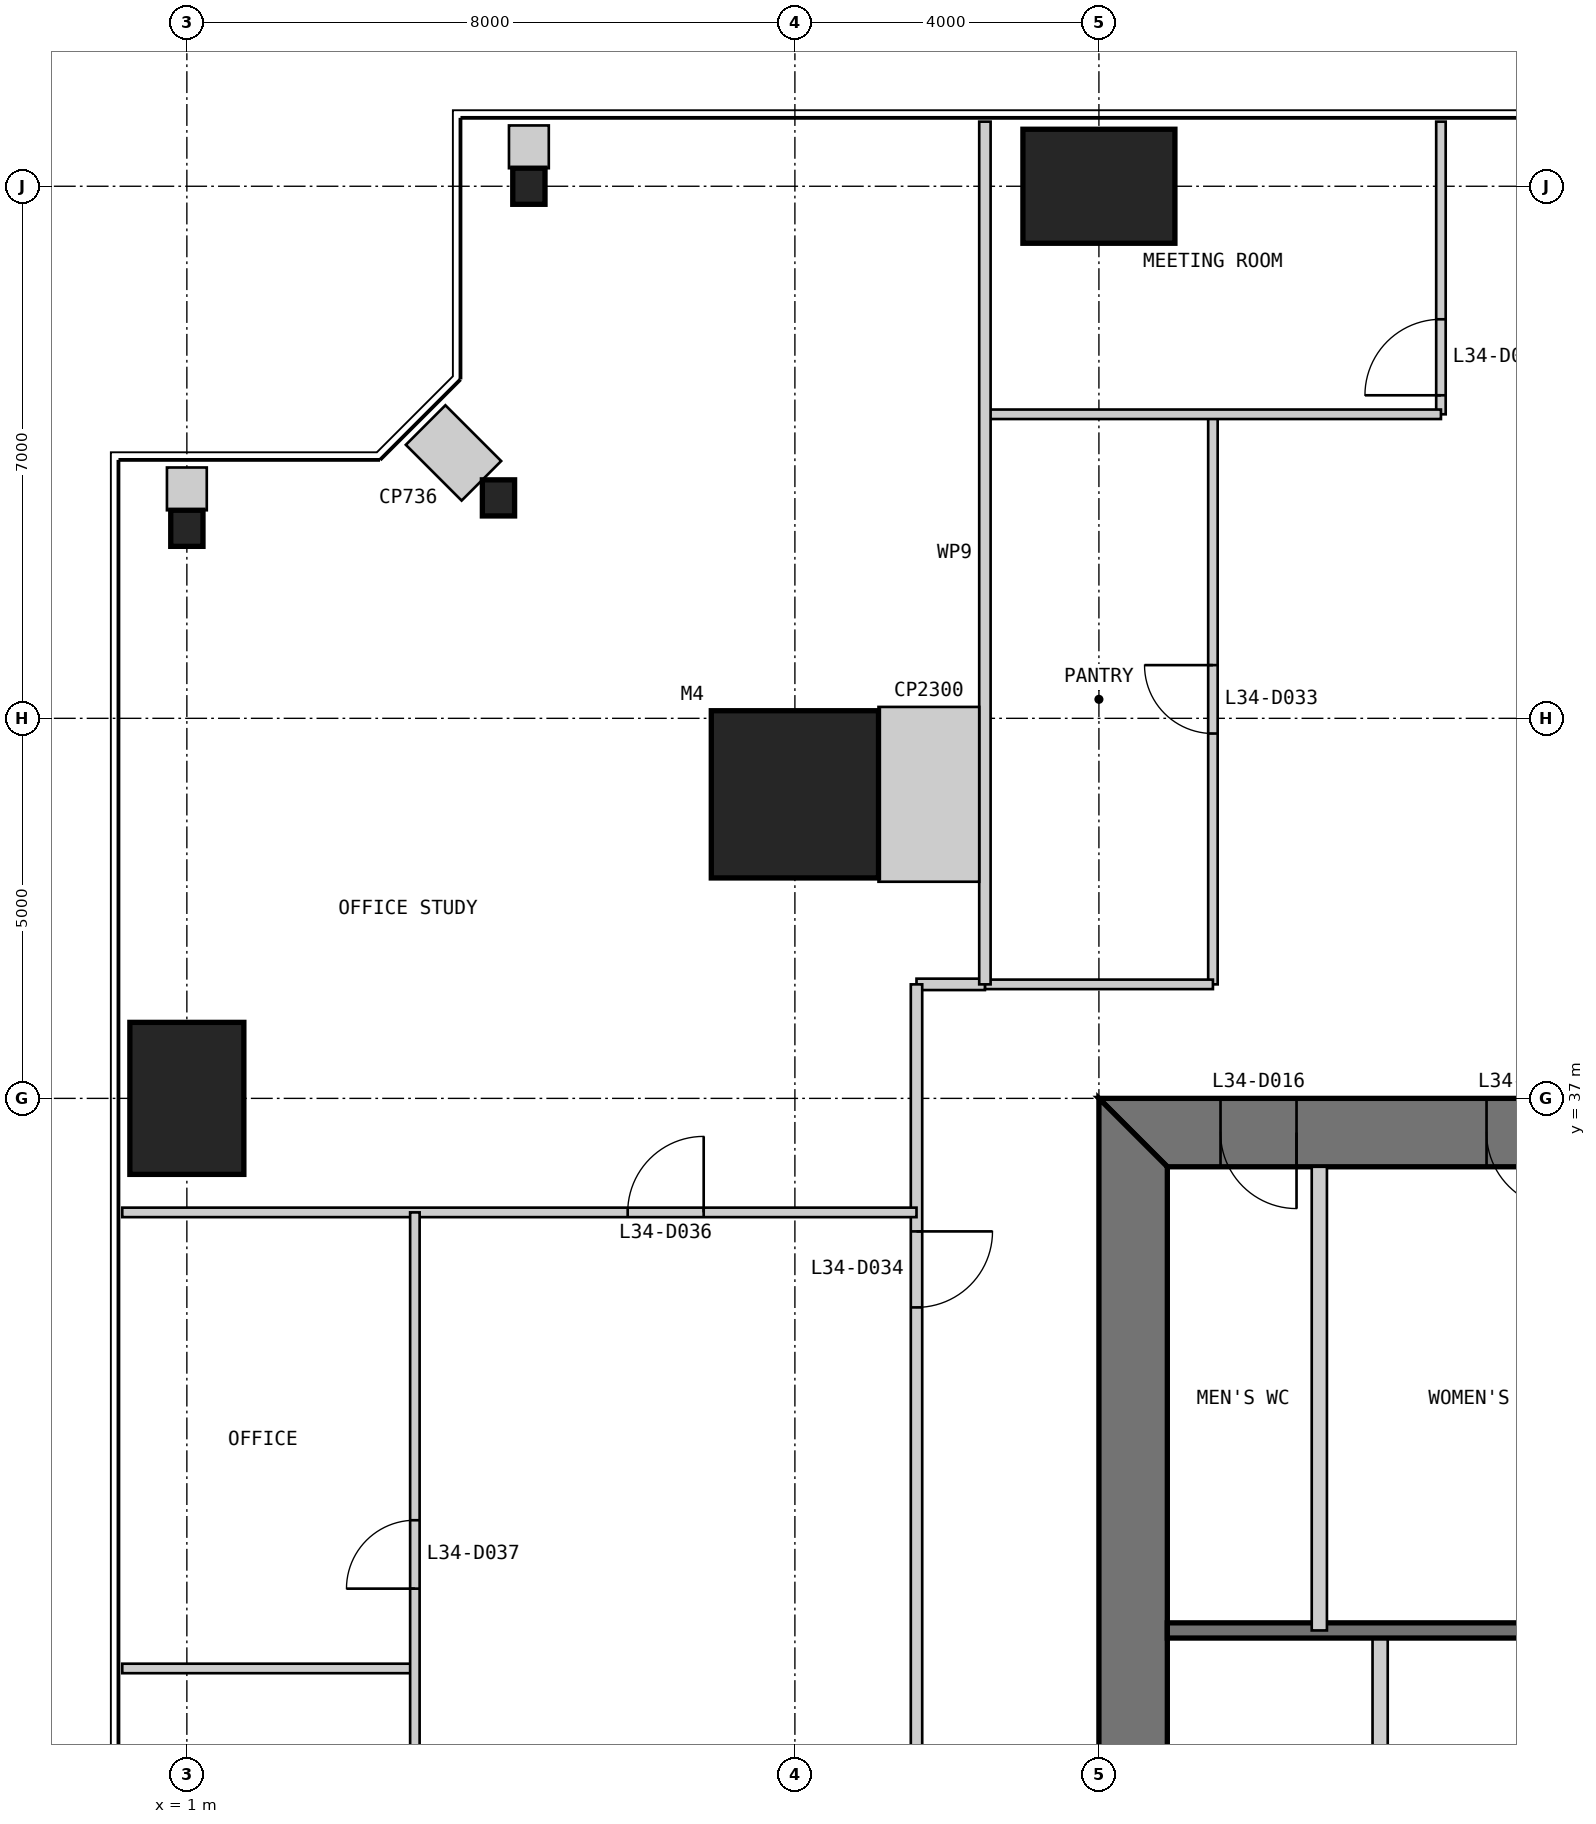
"""IFC4 building model, lengths in metres.
Left out: names, types, materials, properties, quantities, classifications, styles, units other than length and angle.
Written with IfcOpenShell. Run it as: python <this file> out.ifc"""

import sys

from ifc_helpers import new_model, si_unit, direction, frame, frame_2d, origin, origin_2d, place, context, subcontext, project, spatial, polyline, rectangle, i_section, outline, extrude, element, fill, save


model = new_model("IFC4")
c1 = context("Model", 3, precision=1e-05, world=origin(), true_north=direction((0.0, 1.0)))
c2 = subcontext(c1, "Body", "Model", "MODEL_VIEW")
j1 = project(units=[si_unit("LENGTHUNIT", "METRE"), si_unit("PLANEANGLEUNIT", "RADIAN")], contexts=[c1])
p1 = place(None, origin())
s1 = spatial("IfcSite", under=j1, at=p1, CompositionType="ELEMENT")
p2 = place(p1, origin())
s2 = spatial("IfcBuilding", under=s1, at=p2, CompositionType="ELEMENT")
p3 = place(p2, frame((0.0, 0.0, 146.4)))
s3 = spatial("IfcBuildingStorey", under=s2, at=p3, CompositionType="ELEMENT", Elevation=146.4)
p4 = place(p3, frame((9.0, 41.0, 0.0), z_axis=(0.0, 0.0, 1.0), x_axis=(1.0, 0.0, 0.0)))
e1 = element("IfcColumn", 1, at=p4, inside=s3, PredefinedType="COLUMN", context=c2, shape_type="SweptSolid", body=[
    extrude(rectangle(XDim=2.2, YDim=2.2, at=origin_2d()), origin(), (0.0, 0.0, 1.0), 4.0),
])
p5 = place(p3, frame((13.0, 49.0, 0.0), z_axis=(0.0, 0.0, 1.0), x_axis=(1.0, 0.0, 0.0)))
e2 = element("IfcColumn", 2, at=p5, inside=s3, PredefinedType="COLUMN", context=c2, shape_type="SweptSolid", body=[
    extrude(rectangle(XDim=2.0, YDim=1.5, at=origin_2d()), origin(), (0.0, 0.0, 1.0), 4.0),
])
for number, where, z_axis, x_axis in (
    (3, (5.5, 49.0, 0.0), (0.0, 0.0, 1.0), (1.0, 0.0, 0.0)),
    (4, (5.1, 44.9, 0.0), (0.0, 0.0, 1.0), (1.0, 0.0, 0.0)),
    (5, (1.0, 44.5, 0.0), (0.0, 0.0, 1.0), (1.0, 0.0, 0.0)),
):
    element("IfcColumn", number, at=place(p3, frame(where, z_axis=z_axis, x_axis=x_axis)), inside=s3, PredefinedType="COLUMN", context=c2, shape_type="SweptSolid", body=[
        extrude(i_section(OverallWidth=0.424, OverallDepth=0.475, WebThickness=0.048, FlangeThickness=0.077, at=origin_2d()), origin(), (0.0, 0.0, 1.0), 4.0),
    ])
p6 = place(p3, frame((1.0, 37.0, 0.0), z_axis=(0.0, 0.0, 1.0), x_axis=(1.0, 0.0, 0.0)))
e6 = element("IfcColumn", 6, at=p6, inside=s3, PredefinedType="COLUMN", context=c2, shape_type="SweptSolid", body=[
    extrude(rectangle(XDim=1.5, YDim=2.0, at=origin_2d()), origin(), (0.0, 0.0, 1.0), 4.0),
])
p7 = place(p3, frame((37.0, 36.55, 0.0), z_axis=(0.0, 0.0, 1.0), x_axis=(-1.0, 0.0, 0.0)))
e7 = element("IfcWall", 7, at=p7, inside=s3, PredefinedType="SHEAR", context=c2, shape_type="SweptSolid", body=[
    extrude(outline(polyline([(0.0, -0.45), (24.0, -0.45), (23.1, 0.45), (0.9, 0.45), (0.0, -0.45)])), origin(), (0.0, 0.0, 1.0), 4.0),
])
p8 = place(p7, frame((4.9, 0.0, 0.0)))
e8 = element("IfcOpeningElement", 8, at=p8, cuts=e7, PredefinedType="OPENING", context=c2, shape_type="SweptSolid", body=[
    extrude(rectangle(XDim=1.0, YDim=2.2, at=frame_2d((0.5, 1.1))), frame((0.0, 0.46, 0.0), z_axis=(0.0, -1.0, 0.0), x_axis=(1.0, 0.0, 0.0)), (0.0, 0.0, 1.0), 0.92),
])
p9 = place(p7, frame((8.9, 0.0, 0.0)))
e9 = element("IfcOpeningElement", 9, at=p9, cuts=e7, PredefinedType="OPENING", context=c2, shape_type="SweptSolid", body=[
    extrude(rectangle(XDim=1.1, YDim=2.2, at=frame_2d((0.55, 1.1))), frame((0.0, 0.46, 0.0), z_axis=(0.0, -1.0, 0.0), x_axis=(1.0, 0.0, 0.0)), (0.0, 0.0, 1.0), 0.92),
])
p10 = place(p7, frame((15.05, 0.0, 0.0)))
e10 = element("IfcOpeningElement", 10, at=p10, cuts=e7, PredefinedType="OPENING", context=c2, shape_type="SweptSolid", body=[
    extrude(rectangle(XDim=0.9, YDim=2.2, at=frame_2d((0.45, 1.1))), frame((0.0, 0.46, 0.0), z_axis=(0.0, -1.0, 0.0), x_axis=(1.0, 0.0, 0.0)), (0.0, 0.0, 1.0), 0.92),
])
p11 = place(p7, frame((17.9, 0.0, 0.0)))
e11 = element("IfcOpeningElement", 11, at=p11, cuts=e7, PredefinedType="OPENING", context=c2, shape_type="SweptSolid", body=[
    extrude(rectangle(XDim=1.0, YDim=2.2, at=frame_2d((0.5, 1.1))), frame((0.0, 0.46, 0.0), z_axis=(0.0, -1.0, 0.0), x_axis=(1.0, 0.0, 0.0)), (0.0, 0.0, 1.0), 0.92),
])
p12 = place(p7, frame((21.4, 0.0, 0.0)))
e12 = element("IfcOpeningElement", 12, at=p12, cuts=e7, PredefinedType="OPENING", context=c2, shape_type="SweptSolid", body=[
    extrude(rectangle(XDim=1.0, YDim=2.2, at=frame_2d((0.5, 1.1))), frame((0.0, 0.46, 0.0), z_axis=(0.0, -1.0, 0.0), x_axis=(1.0, 0.0, 0.0)), (0.0, 0.0, 1.0), 0.92),
])
p13 = place(p3, frame((13.45, 36.1, 0.0), z_axis=(0.0, 0.0, 1.0), x_axis=(0.0, -1.0, 0.0)))
e13 = element("IfcWall", 13, at=p13, inside=s3, PredefinedType="SHEAR", context=c2, shape_type="SweptSolid", body=[
    extrude(outline(polyline([(-0.9, -0.45), (23.1, -0.45), (22.2, 0.45), (0.0, 0.45), (-0.9, -0.45)])), origin(), (0.0, 0.0, 1.0), 4.0),
])
p14 = place(p13, frame((20.2, 0.0, 0.0)))
e14 = element("IfcOpeningElement", 14, at=p14, cuts=e13, PredefinedType="OPENING", context=c2, shape_type="SweptSolid", body=[
    extrude(rectangle(XDim=1.0, YDim=2.2, at=frame_2d((0.5, 1.1))), frame((0.0, 0.46, 0.0), z_axis=(0.0, -1.0, 0.0), x_axis=(1.0, 0.0, 0.0)), (0.0, 0.0, 1.0), 0.92),
])
p15 = place(p13, frame((17.25, 0.0, 0.0)))
e15 = element("IfcOpeningElement", 15, at=p15, cuts=e13, PredefinedType="OPENING", context=c2, shape_type="SweptSolid", body=[
    extrude(rectangle(XDim=0.9, YDim=2.2, at=frame_2d((0.45, 1.1))), frame((0.0, 0.46, 0.0), z_axis=(0.0, -1.0, 0.0), x_axis=(1.0, 0.0, 0.0)), (0.0, 0.0, 1.0), 0.92),
])
p16 = place(p3, frame((16.7, 13.9, 0.0), z_axis=(0.0, 0.0, 1.0), x_axis=(0.0, 1.0, 0.0)))
e16 = element("IfcWall", 16, at=p16, inside=s3, PredefinedType="PARTITIONING", context=c2, shape_type="SweptSolid", body=[
    extrude(rectangle(XDim=16.1, YDim=0.2, at=frame_2d((8.05, 0.0))), origin(), (0.0, 0.0, 1.0), 3.8),
])
p17 = place(p16, frame((7.95, 0.0, 0.0)))
e17 = element("IfcOpeningElement", 17, at=p17, cuts=e16, PredefinedType="OPENING", context=c2, shape_type="SweptSolid", body=[
    extrude(rectangle(XDim=0.9, YDim=2.2, at=frame_2d((0.45, 1.1))), frame((0.0, 0.11, 0.0), z_axis=(0.0, -1.0, 0.0), x_axis=(1.0, 0.0, 0.0)), (0.0, 0.0, 1.0), 0.22),
])
p18 = place(p16, frame((12.9, 0.0, 0.0)))
e18 = element("IfcOpeningElement", 18, at=p18, cuts=e16, PredefinedType="OPENING", context=c2, shape_type="SweptSolid", body=[
    extrude(rectangle(XDim=0.9, YDim=2.2, at=frame_2d((0.45, 1.1))), frame((0.0, 0.11, 0.0), z_axis=(0.0, -1.0, 0.0), x_axis=(1.0, 0.0, 0.0)), (0.0, 0.0, 1.0), 0.22),
])
p19 = place(p3, frame((29.7, 30.0, 0.0), z_axis=(0.0, 0.0, 1.0), x_axis=(-1.0, 0.0, 0.0)))
e19 = element("IfcWall", 19, at=p19, inside=s3, PredefinedType="SOLIDWALL", context=c2, shape_type="SweptSolid", body=[
    extrude(rectangle(XDim=15.8, YDim=0.2, at=frame_2d((7.9, 0.0))), origin(), (0.0, 0.0, 1.0), 3.8),
])
p20 = place(p3, frame((15.9, 36.1, 0.0), z_axis=(0.0, 0.0, 1.0), x_axis=(0.0, -1.0, 0.0)))
e20 = element("IfcWall", 20, at=p20, inside=s3, PredefinedType="PARTITIONING", context=c2, shape_type="SweptSolid", body=[
    extrude(rectangle(XDim=6.1, YDim=0.2, at=frame_2d((3.05, 0.0))), origin(), (0.0, 0.0, 1.0), 3.8),
])
p21 = place(p3, frame((17.5, 49.85, 0.0), z_axis=(0.0, 0.0, 1.0), x_axis=(0.0, -1.0, 0.0)))
e21 = element("IfcWall", 21, at=p21, inside=s3, PredefinedType="PARTITIONING", context=c2, shape_type="SweptSolid", body=[
    extrude(rectangle(XDim=3.85, YDim=0.125, at=frame_2d((1.925, 0.0))), origin(), (0.0, 0.0, 1.0), 3.85),
])
p22 = place(p21, frame((2.6, 0.0, 0.0)))
e22 = element("IfcOpeningElement", 22, at=p22, cuts=e21, PredefinedType="OPENING", context=c2, shape_type="SweptSolid", body=[
    extrude(rectangle(XDim=1.0, YDim=2.2, at=frame_2d((0.5, 1.1))), frame((0.0, 0.073, 0.0), z_axis=(0.0, -1.0, 0.0), x_axis=(1.0, 0.0, 0.0)), (0.0, 0.0, 1.0), 0.145),
])
p23 = place(p3, frame((14.5, 46.0, 0.0), z_axis=(0.0, 0.0, 1.0), x_axis=(0.0, -1.0, 0.0)))
e23 = element("IfcWall", 23, at=p23, inside=s3, PredefinedType="PARTITIONING", context=c2, shape_type="SweptSolid", body=[
    extrude(rectangle(XDim=7.5, YDim=0.125, at=frame_2d((3.75, 0.0))), origin(), (0.0, 0.0, 1.0), 3.85),
])
p24 = place(p23, frame((3.3, 0.0, 0.0)))
e24 = element("IfcOpeningElement", 24, at=p24, cuts=e23, PredefinedType="OPENING", context=c2, shape_type="SweptSolid", body=[
    extrude(rectangle(XDim=0.9, YDim=2.2, at=frame_2d((0.45, 1.1))), frame((0.0, 0.073, 0.0), z_axis=(0.0, -1.0, 0.0), x_axis=(1.0, 0.0, 0.0)), (0.0, 0.0, 1.0), 0.145),
])
p25 = place(p3, frame((17.5, 46.0, 0.0), z_axis=(0.0, 0.0, 1.0), x_axis=(-1.0, 0.0, 0.0)))
e25 = element("IfcWall", 25, at=p25, inside=s3, PredefinedType="PARTITIONING", context=c2, shape_type="SweptSolid", body=[
    extrude(rectangle(XDim=6.0, YDim=0.125, at=frame_2d((3.0, 0.0))), origin(), (0.0, 0.0, 1.0), 3.85),
])
p26 = place(p3, frame((14.5, 38.5, 0.0), z_axis=(0.0, 0.0, 1.0), x_axis=(-1.0, 0.0, 0.0)))
e26 = element("IfcWall", 26, at=p26, inside=s3, PredefinedType="PARTITIONING", context=c2, shape_type="SweptSolid", body=[
    extrude(rectangle(XDim=3.0, YDim=0.125, at=frame_2d((1.5, 0.0))), origin(), (0.0, 0.0, 1.0), 3.85),
])
p27 = place(p3, frame((11.5, 38.5, 0.0), z_axis=(0.0, 0.0, 1.0), x_axis=(-1.0, 0.0, 0.0)))
e27 = element("IfcWall", 27, at=p27, inside=s3, PredefinedType="PARTITIONING", context=c2, shape_type="SweptSolid", body=[
    extrude(rectangle(XDim=0.9, YDim=0.15, at=frame_2d((0.45, 0.0))), origin(), (0.0, 0.0, 1.0), 3.85),
])
p28 = place(p3, frame((10.6, 38.5, 0.0), z_axis=(0.0, 0.0, 1.0), x_axis=(0.0, -1.0, 0.0)))
e28 = element("IfcWall", 28, at=p28, inside=s3, PredefinedType="PARTITIONING", context=c2, shape_type="SweptSolid", body=[
    extrude(rectangle(XDim=27.9, YDim=0.15, at=frame_2d((13.95, 0.0))), origin(), (0.0, 0.0, 1.0), 3.85),
])
p29 = place(p28, frame((3.25, 0.0, 0.0)))
e29 = element("IfcOpeningElement", 29, at=p29, cuts=e28, PredefinedType="OPENING", context=c2, shape_type="SweptSolid", body=[
    extrude(rectangle(XDim=1.0, YDim=2.2, at=frame_2d((0.5, 1.1))), frame((0.0, 0.085, 0.0), z_axis=(0.0, -1.0, 0.0), x_axis=(1.0, 0.0, 0.0)), (0.0, 0.0, 1.0), 0.17),
])
p30 = place(p28, frame((25.75, 0.0, 0.0)))
e30 = element("IfcOpeningElement", 30, at=p30, cuts=e28, PredefinedType="OPENING", context=c2, shape_type="SweptSolid", body=[
    extrude(rectangle(XDim=1.0, YDim=2.2, at=frame_2d((0.5, 1.1))), frame((0.0, 0.085, 0.0), z_axis=(0.0, -1.0, 0.0), x_axis=(1.0, 0.0, 0.0)), (0.0, 0.0, 1.0), 0.17),
])
p31 = place(p3, frame((11.5, 49.85, 0.0), z_axis=(0.0, 0.0, 1.0), x_axis=(0.0, -1.0, 0.0)))
e31 = element("IfcWall", 31, at=p31, inside=s3, PredefinedType="PARTITIONING", context=c2, shape_type="SweptSolid", body=[
    extrude(rectangle(XDim=11.35, YDim=0.15, at=frame_2d((5.675, 0.0))), origin(), (0.0, 0.0, 1.0), 3.85),
])
p32 = place(p3, frame((0.15, 35.5, 0.0), z_axis=(0.0, 0.0, 1.0), x_axis=(1.0, 0.0, 0.0)))
e32 = element("IfcWall", 32, at=p32, inside=s3, PredefinedType="PARTITIONING", context=c2, shape_type="SweptSolid", body=[
    extrude(rectangle(XDim=10.45, YDim=0.125, at=frame_2d((5.225, 0.0))), origin(), (0.0, 0.0, 1.0), 3.85),
])
p33 = place(p32, frame((6.65, 0.0, 0.0)))
e33 = element("IfcOpeningElement", 33, at=p33, cuts=e32, PredefinedType="OPENING", context=c2, shape_type="SweptSolid", body=[
    extrude(rectangle(XDim=1.0, YDim=2.2, at=frame_2d((0.5, 1.1))), frame((0.0, 0.073, 0.0), z_axis=(0.0, -1.0, 0.0), x_axis=(1.0, 0.0, 0.0)), (0.0, 0.0, 1.0), 0.145),
])
p34 = place(p3, frame((0.15, 29.5, 0.0), z_axis=(0.0, 0.0, 1.0), x_axis=(1.0, 0.0, 0.0)))
e34 = element("IfcWall", 34, at=p34, inside=s3, PredefinedType="PARTITIONING", context=c2, shape_type="SweptSolid", body=[
    extrude(rectangle(XDim=3.85, YDim=0.125, at=frame_2d((1.925, 0.0))), origin(), (0.0, 0.0, 1.0), 3.85),
])
p35 = place(p3, frame((4.0, 35.5, 0.0), z_axis=(0.0, 0.0, 1.0), x_axis=(0.0, -1.0, 0.0)))
e35 = element("IfcWall", 35, at=p35, inside=s3, PredefinedType="PARTITIONING", context=c2, shape_type="SweptSolid", body=[
    extrude(rectangle(XDim=24.0, YDim=0.125, at=frame_2d((12.0, 0.0))), origin(), (0.0, 0.0, 1.0), 3.238),
])
p36 = place(p35, frame((4.05, 0.0, 0.0)))
e36 = element("IfcOpeningElement", 36, at=p36, cuts=e35, PredefinedType="OPENING", context=c2, shape_type="SweptSolid", body=[
    extrude(rectangle(XDim=0.9, YDim=2.2, at=frame_2d((0.45, 1.1))), frame((0.0, 0.073, 0.0), z_axis=(0.0, -1.0, 0.0), x_axis=(1.0, 0.0, 0.0)), (0.0, 0.0, 1.0), 0.145),
])
p37 = place(p35, frame((10.05, 0.0, 0.0)))
e37 = element("IfcOpeningElement", 37, at=p37, cuts=e35, PredefinedType="OPENING", context=c2, shape_type="SweptSolid", body=[
    extrude(rectangle(XDim=0.9, YDim=2.2, at=frame_2d((0.45, 1.1))), frame((0.0, 0.073, 0.0), z_axis=(0.0, -1.0, 0.0), x_axis=(1.0, 0.0, 0.0)), (0.0, 0.0, 1.0), 0.145),
])
p38 = place(p35, frame((22.0, 0.0, 0.0)))
e38 = element("IfcOpeningElement", 38, at=p38, cuts=e35, PredefinedType="OPENING", context=c2, shape_type="SweptSolid", body=[
    extrude(rectangle(XDim=1.0, YDim=2.2, at=frame_2d((0.5, 1.1))), frame((0.0, 0.073, 0.0), z_axis=(0.0, -1.0, 0.0), x_axis=(1.0, 0.0, 0.0)), (0.0, 0.0, 1.0), 0.145),
])
p39 = place(p3, frame((11.425, 41.0, 0.0), z_axis=(0.0, 0.0, 1.0), x_axis=(-1.0, 0.0, 0.0)))
e39 = element("IfcWall", 39, at=p39, inside=s3, PredefinedType="PARTITIONING", context=c2, shape_type="SweptSolid", body=[
    extrude(rectangle(XDim=1.325, YDim=2.3, at=frame_2d((0.663, 0.0))), origin(), (0.0, 0.0, 1.0), 3.85),
])
p40 = place(p3, frame((5.5, 49.8, 0.0), z_axis=(0.0, 0.0, 1.0), x_axis=(0.0, -1.0, 0.0)))
e40 = element("IfcWall", 40, at=p40, inside=s3, PredefinedType="PARTITIONING", context=c2, shape_type="SweptSolid", body=[
    extrude(rectangle(XDim=0.562, YDim=0.524, at=frame_2d((0.281, 0.0))), origin(), (0.0, 0.0, 1.0), 3.85),
])
p41 = place(p3, frame((4.141, 45.859, 0.0), z_axis=(0.0, 0.0, 1.0), x_axis=(0.707106781187, -0.707106781187, 0.0)))
e41 = element("IfcWall", 41, at=p41, inside=s3, PredefinedType="PARTITIONING", context=c2, shape_type="SweptSolid", body=[
    extrude(rectangle(XDim=1.038, YDim=0.736, at=frame_2d((0.519, 0.0))), origin(), (0.0, 0.0, 1.0), 3.85),
])
p42 = place(p3, frame((1.0, 45.3, 0.0), z_axis=(0.0, 0.0, 1.0), x_axis=(0.0, -1.0, 0.0)))
e42 = element("IfcWall", 42, at=p42, inside=s3, PredefinedType="PARTITIONING", context=c2, shape_type="SweptSolid", body=[
    extrude(rectangle(XDim=0.562, YDim=0.524, at=frame_2d((0.281, 0.0))), origin(), (0.0, 0.0, 1.0), 3.85),
])
p43 = place(p11, origin())
e43 = element("IfcDoor", 43, at=p43, inside=s3, OperationType="SINGLE_SWING_LEFT", PredefinedType="DOOR", context=c2, shape_type="SweptSolid", body=[
    extrude(rectangle(XDim=1.0, YDim=2.2, at=frame_2d((0.5, 1.1))), frame((0.0, 0.025, 0.0), z_axis=(0.0, -1.0, 0.0), x_axis=(1.0, 0.0, 0.0)), (0.0, 0.0, 1.0), 0.05),
    extrude(outline(polyline([(0.0, 0.0), (0.04, 0.0), (0.04, 2.16), (0.96, 2.16), (0.96, 0.0), (1.0, 0.0), (1.0, 2.2), (0.0, 2.2), (0.0, 0.0)])), frame((0.0, 0.3, 0.0), z_axis=(0.0, -1.0, 0.0), x_axis=(1.0, 0.0, 0.0)), (0.0, 0.0, 1.0), 0.6),
])
fill(e11, e43)
p44 = place(p12, origin())
e44 = element("IfcDoor", 44, at=p44, inside=s3, OperationType="SINGLE_SWING_LEFT", PredefinedType="DOOR", context=c2, shape_type="SweptSolid", body=[
    extrude(rectangle(XDim=1.0, YDim=2.2, at=frame_2d((0.5, 1.1))), frame((0.0, 0.025, 0.0), z_axis=(0.0, -1.0, 0.0), x_axis=(1.0, 0.0, 0.0)), (0.0, 0.0, 1.0), 0.05),
    extrude(outline(polyline([(0.0, 0.0), (0.04, 0.0), (0.04, 2.16), (0.96, 2.16), (0.96, 0.0), (1.0, 0.0), (1.0, 2.2), (0.0, 2.2), (0.0, 0.0)])), frame((0.0, 0.3, 0.0), z_axis=(0.0, -1.0, 0.0), x_axis=(1.0, 0.0, 0.0)), (0.0, 0.0, 1.0), 0.6),
])
fill(e12, e44)
p45 = place(p22, frame((1.0, 0.0, 0.0), z_axis=(0.0, 0.0, 1.0), x_axis=(-1.0, 0.0, 0.0)))
e45 = element("IfcDoor", 45, at=p45, inside=s3, OperationType="SINGLE_SWING_LEFT", PredefinedType="DOOR", context=c2, shape_type="SweptSolid", body=[
    extrude(rectangle(XDim=1.0, YDim=2.2, at=frame_2d((0.5, 1.1))), frame((0.0, 0.025, 0.0), z_axis=(0.0, -1.0, 0.0), x_axis=(1.0, 0.0, 0.0)), (0.0, 0.0, 1.0), 0.05),
])
fill(e22, e45)
p46 = place(p24, frame((0.9, 0.0, 0.0), z_axis=(0.0, 0.0, 1.0), x_axis=(-1.0, 0.0, 0.0)))
e46 = element("IfcDoor", 46, at=p46, inside=s3, OperationType="SINGLE_SWING_RIGHT", PredefinedType="DOOR", context=c2, shape_type="SweptSolid", body=[
    extrude(rectangle(XDim=0.9, YDim=2.2, at=frame_2d((0.45, 1.1))), frame((0.0, 0.025, 0.0), z_axis=(0.0, -1.0, 0.0), x_axis=(1.0, 0.0, 0.0)), (0.0, 0.0, 1.0), 0.05),
])
fill(e24, e46)
p47 = place(p29, origin())
e47 = element("IfcDoor", 47, at=p47, inside=s3, OperationType="SINGLE_SWING_LEFT", PredefinedType="DOOR", context=c2, shape_type="SweptSolid", body=[
    extrude(rectangle(XDim=1.0, YDim=2.2, at=frame_2d((0.5, 1.1))), frame((0.0, 0.025, 0.0), z_axis=(0.0, -1.0, 0.0), x_axis=(1.0, 0.0, 0.0)), (0.0, 0.0, 1.0), 0.05),
])
fill(e29, e47)
p48 = place(p33, origin())
e48 = element("IfcDoor", 48, at=p48, inside=s3, OperationType="SINGLE_SWING_RIGHT", PredefinedType="DOOR", context=c2, shape_type="SweptSolid", body=[
    extrude(rectangle(XDim=1.0, YDim=2.2, at=frame_2d((0.5, 1.1))), frame((0.0, 0.025, 0.0), z_axis=(0.0, -1.0, 0.0), x_axis=(1.0, 0.0, 0.0)), (0.0, 0.0, 1.0), 0.05),
])
fill(e33, e48)
p49 = place(p36, frame((0.9, 0.0, 0.0), z_axis=(0.0, 0.0, 1.0), x_axis=(-1.0, 0.0, 0.0)))
e49 = element("IfcDoor", 49, at=p49, inside=s3, OperationType="SINGLE_SWING_LEFT", PredefinedType="DOOR", context=c2, shape_type="SweptSolid", body=[
    extrude(rectangle(XDim=0.9, YDim=2.2, at=frame_2d((0.45, 1.1))), frame((0.0, 0.025, 0.0), z_axis=(0.0, -1.0, 0.0), x_axis=(1.0, 0.0, 0.0)), (0.0, 0.0, 1.0), 0.05),
])
fill(e36, e49)
save(model, sys.argv[1])
